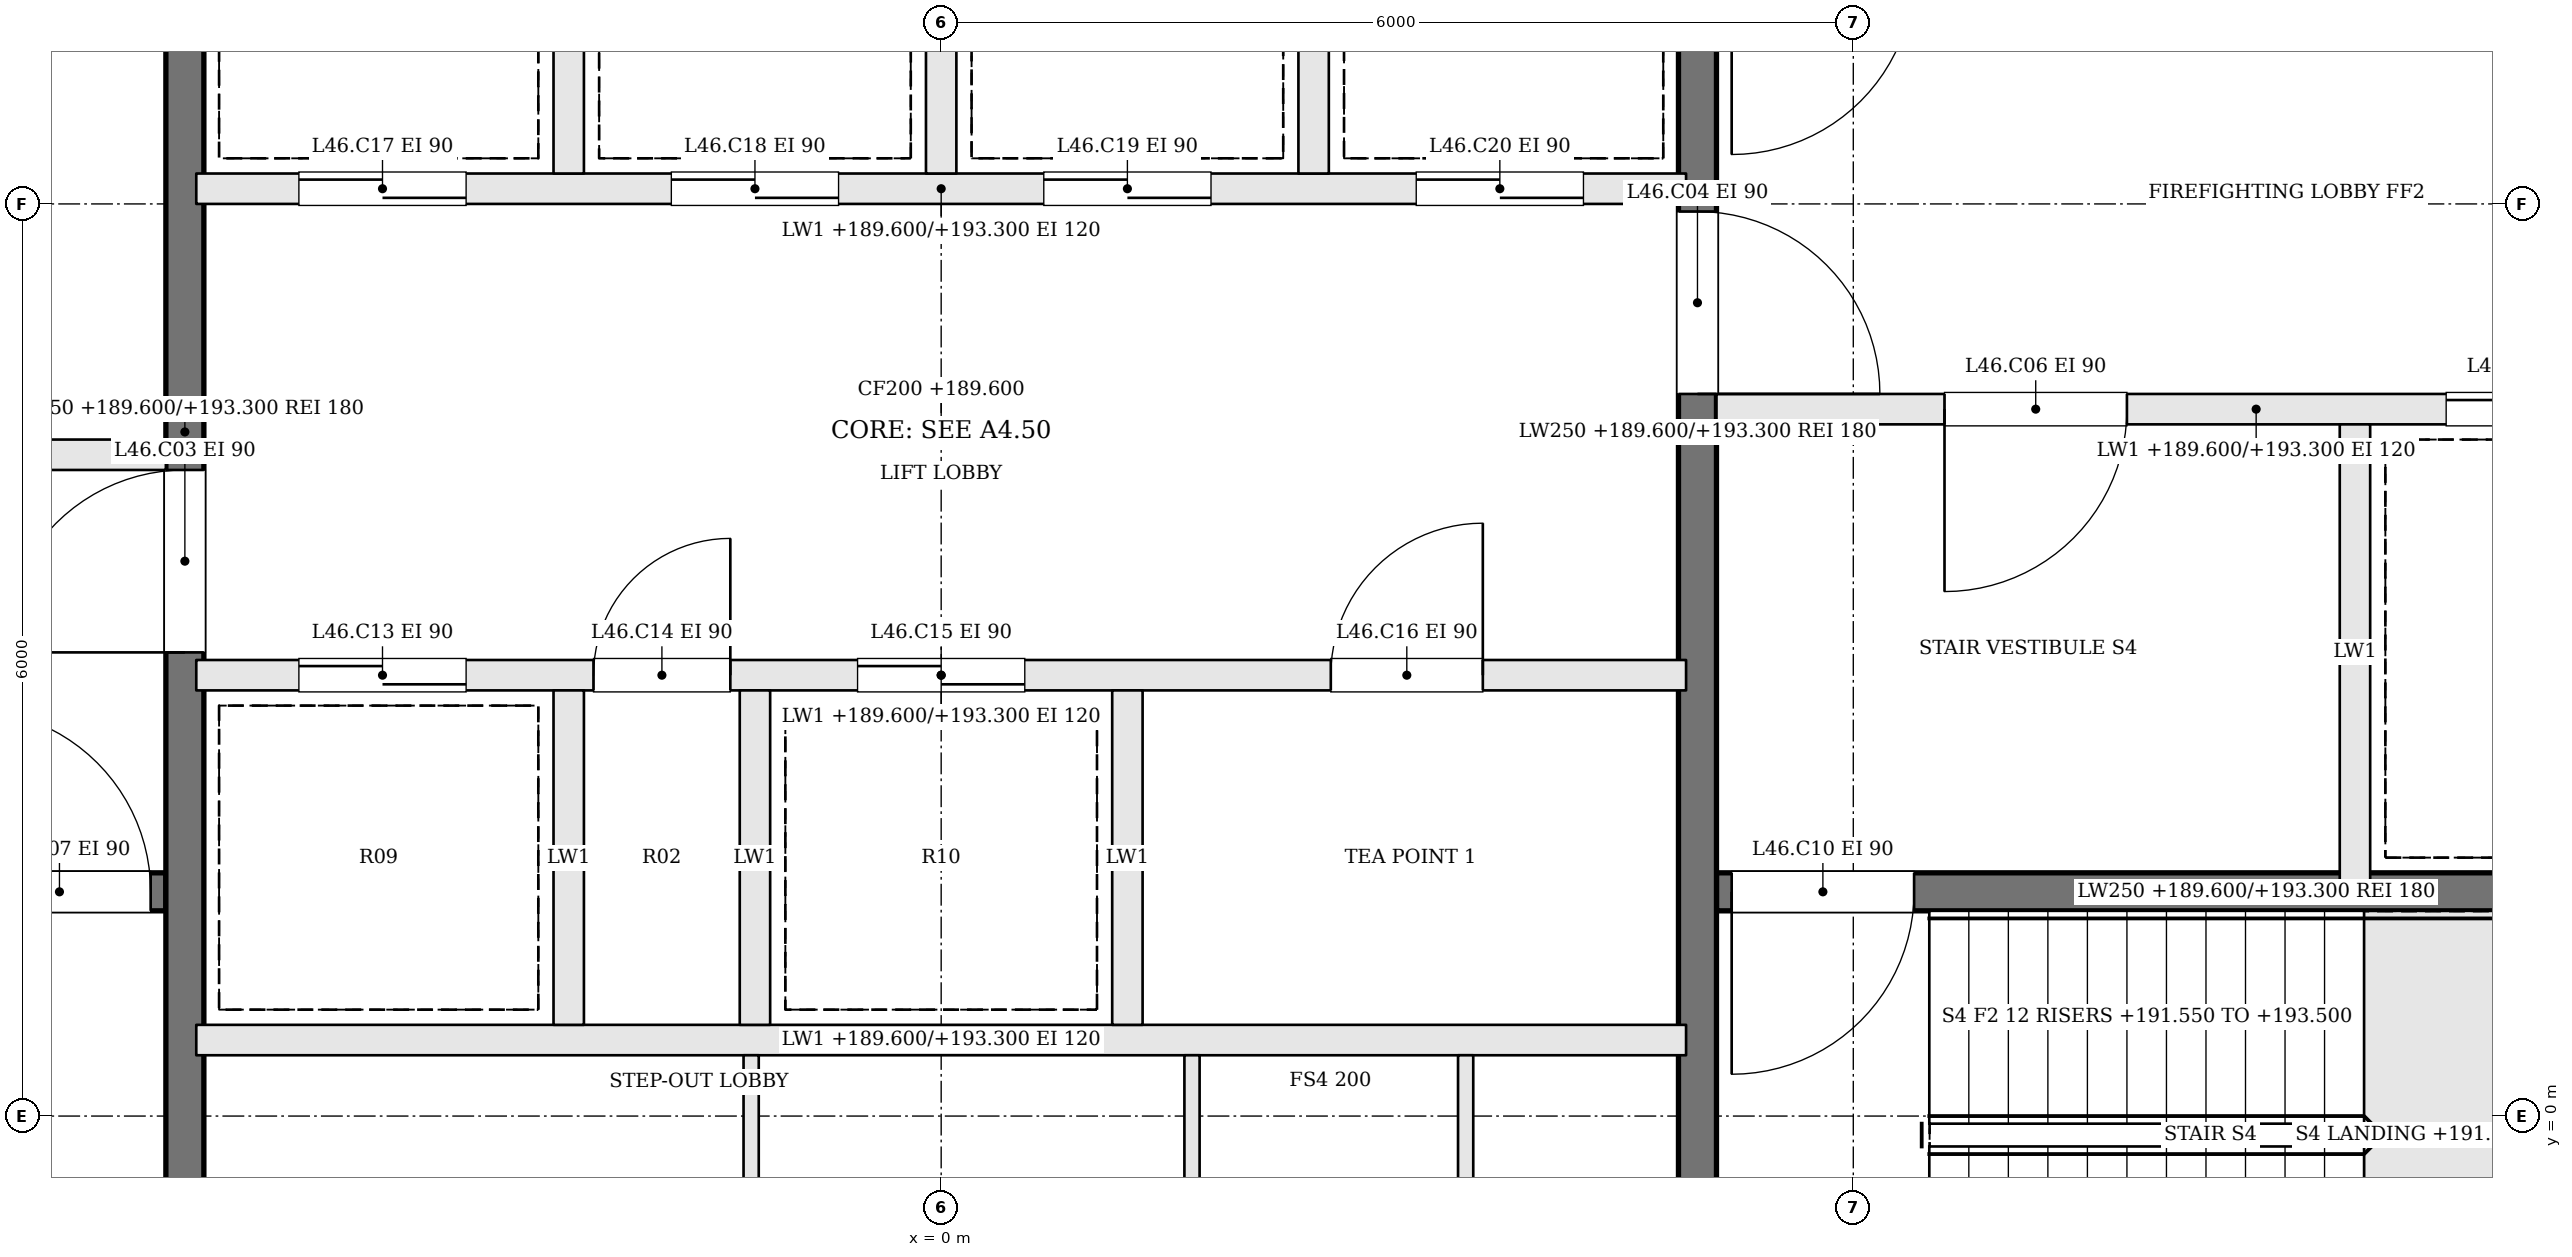
"""IFC4 building model, lengths in metres.
Left out: names, types, materials, properties, quantities, classifications, styles, units other than length and angle.
Written with IfcOpenShell. Run it as: python <this file> out.ifc"""

import sys

from ifc_helpers import new_model, si_unit, direction, frame, frame_2d, origin, place, context, subcontext, project, spatial, rectangle, extrude, element, fill, save


model = new_model("IFC4")
c1 = context("Model", 3, precision=1e-05, world=origin(), true_north=direction((0.0, 1.0)))
c2 = subcontext(c1, "Body", "Model", "MODEL_VIEW")
j1 = project(units=[si_unit("LENGTHUNIT", "METRE"), si_unit("PLANEANGLEUNIT", "RADIAN")], contexts=[c1])
p1 = place(None, origin())
s1 = spatial("IfcSite", under=j1, at=p1, CompositionType="ELEMENT")
p2 = place(p1, origin())
s2 = spatial("IfcBuilding", under=s1, at=p2, CompositionType="ELEMENT")
p3 = place(p2, frame((0.0, 0.0, 189.6)))
s3 = spatial("IfcBuildingStorey", under=s2, at=p3, CompositionType="ELEMENT", Elevation=189.6)
p4 = place(p3, frame((-12.2, 1.475, 0.0), z_axis=(0.0, 0.0, 1.0), x_axis=(1.0, 0.0, 0.0)))
e1 = element("IfcWall", 1, at=p4, inside=s3, PredefinedType="SOLIDWALL", context=c2, shape_type="SweptSolid", body=[
    extrude(rectangle(XDim=7.1, YDim=0.25, at=frame_2d((3.55, 0.0))), origin(), (0.0, 0.0, 1.0), 3.7),
])
p5 = place(p4, frame((5.8, 0.0, 0.0)))
e2 = element("IfcOpeningElement", 2, at=p5, cuts=e1, PredefinedType="OPENING", context=c2, shape_type="SweptSolid", body=[
    extrude(rectangle(XDim=1.2, YDim=2.1, at=frame_2d((0.6, 1.05))), frame((0.0, 0.135, 0.0), z_axis=(0.0, -1.0, 0.0), x_axis=(1.0, 0.0, 0.0)), (0.0, 0.0, 1.0), 0.27),
])
p6 = place(p3, frame((-12.2, 4.35, 0.0), z_axis=(0.0, 0.0, 1.0), x_axis=(1.0, 0.0, 0.0)))
e3 = element("IfcWall", 3, at=p6, inside=s3, PredefinedType="SOLIDWALL", context=c2, shape_type="SweptSolid", body=[
    extrude(rectangle(XDim=7.1, YDim=0.2, at=frame_2d((3.55, 0.0))), origin(), (0.0, 0.0, 1.0), 3.7),
])
p7 = place(p6, frame((4.4, 0.0, 0.0)))
e4 = element("IfcOpeningElement", 4, at=p7, cuts=e3, PredefinedType="OPENING", context=c2, shape_type="SweptSolid", body=[
    extrude(rectangle(XDim=1.2, YDim=2.1, at=frame_2d((0.6, 1.05))), frame((0.0, 0.11, 0.0), z_axis=(0.0, -1.0, 0.0), x_axis=(1.0, 0.0, 0.0)), (0.0, 0.0, 1.0), 0.22),
])
p8 = place(p6, frame((1.1, 0.0, 0.0)))
e5 = element("IfcOpeningElement", 5, at=p8, cuts=e3, PredefinedType="OPENING", context=c2, shape_type="SweptSolid", body=[
    extrude(rectangle(XDim=1.2, YDim=2.1, at=frame_2d((0.6, 1.05))), frame((0.0, 0.11, 0.0), z_axis=(0.0, -1.0, 0.0), x_axis=(1.0, 0.0, 0.0)), (0.0, 0.0, 1.0), 0.22),
])
p9 = place(p3, frame((12.2, 4.65, 0.0), z_axis=(0.0, 0.0, 1.0), x_axis=(-1.0, 0.0, 0.0)))
e6 = element("IfcWall", 6, at=p9, inside=s3, PredefinedType="SOLIDWALL", context=c2, shape_type="SweptSolid", body=[
    extrude(rectangle(XDim=7.1, YDim=0.2, at=frame_2d((3.55, 0.0))), origin(), (0.0, 0.0, 1.0), 3.7),
])
p10 = place(p9, frame((4.4, 0.0, 0.0)))
e7 = element("IfcOpeningElement", 7, at=p10, cuts=e6, PredefinedType="OPENING", context=c2, shape_type="SweptSolid", body=[
    extrude(rectangle(XDim=1.2, YDim=2.1, at=frame_2d((0.6, 1.05))), frame((0.0, 0.11, 0.0), z_axis=(0.0, -1.0, 0.0), x_axis=(1.0, 0.0, 0.0)), (0.0, 0.0, 1.0), 0.22),
])
p11 = place(p9, frame((1.1, 0.0, 0.0)))
e8 = element("IfcOpeningElement", 8, at=p11, cuts=e6, PredefinedType="OPENING", context=c2, shape_type="SweptSolid", body=[
    extrude(rectangle(XDim=1.2, YDim=2.1, at=frame_2d((0.6, 1.05))), frame((0.0, 0.11, 0.0), z_axis=(0.0, -1.0, 0.0), x_axis=(1.0, 0.0, 0.0)), (0.0, 0.0, 1.0), 0.22),
])
p12 = place(p3, frame((12.2, 1.475, 0.0), z_axis=(0.0, 0.0, 1.0), x_axis=(-1.0, 0.0, 0.0)))
e9 = element("IfcWall", 9, at=p12, inside=s3, PredefinedType="SOLIDWALL", context=c2, shape_type="SweptSolid", body=[
    extrude(rectangle(XDim=7.1, YDim=0.25, at=frame_2d((3.55, 0.0))), origin(), (0.0, 0.0, 1.0), 3.7),
])
p13 = place(p12, frame((5.8, 0.0, 0.0)))
e10 = element("IfcOpeningElement", 10, at=p13, cuts=e9, PredefinedType="OPENING", context=c2, shape_type="SweptSolid", body=[
    extrude(rectangle(XDim=1.2, YDim=2.1, at=frame_2d((0.6, 1.05))), frame((0.0, 0.135, 0.0), z_axis=(0.0, -1.0, 0.0), x_axis=(1.0, 0.0, 0.0)), (0.0, 0.0, 1.0), 0.27),
])
p14 = place(p3, frame((9.3, 4.55, 0.0), z_axis=(0.0, 0.0, 1.0), x_axis=(0.0, -1.0, 0.0)))
e11 = element("IfcWall", 11, at=p14, inside=s3, PredefinedType="SOLIDWALL", context=c2, shape_type="SweptSolid", body=[
    extrude(rectangle(XDim=3.0, YDim=0.2, at=frame_2d((1.5, 0.0))), origin(), (0.0, 0.0, 1.0), 3.7),
])
p15 = place(p3, frame((-4.975, -2.2, 0.0), z_axis=(0.0, 0.0, 1.0), x_axis=(0.0, 1.0, 0.0)))
e12 = element("IfcWall", 12, at=p15, inside=s3, PredefinedType="SOLIDWALL", context=c2, shape_type="SweptSolid", body=[
    extrude(rectangle(XDim=13.4, YDim=0.25, at=frame_2d((6.7, 0.0))), origin(), (0.0, 0.0, 1.0), 3.7),
])
p16 = place(p15, frame((5.25, 0.0, 0.0)))
e13 = element("IfcOpeningElement", 13, at=p16, cuts=e12, PredefinedType="OPENING", context=c2, shape_type="SweptSolid", body=[
    extrude(rectangle(XDim=1.2, YDim=2.1, at=frame_2d((0.6, 1.05))), frame((0.0, 0.135, 0.0), z_axis=(0.0, -1.0, 0.0), x_axis=(1.0, 0.0, 0.0)), (0.0, 0.0, 1.0), 0.27),
])
p17 = place(p3, frame((4.975, 11.2, 0.0), z_axis=(0.0, 0.0, 1.0), x_axis=(0.0, -1.0, 0.0)))
e14 = element("IfcWall", 14, at=p17, inside=s3, PredefinedType="SOLIDWALL", context=c2, shape_type="SweptSolid", body=[
    extrude(rectangle(XDim=13.4, YDim=0.25, at=frame_2d((6.7, 0.0))), origin(), (0.0, 0.0, 1.0), 3.7),
])
p18 = place(p17, frame((5.25, 0.0, 0.0)))
e15 = element("IfcOpeningElement", 15, at=p18, cuts=e14, PredefinedType="OPENING", context=c2, shape_type="SweptSolid", body=[
    extrude(rectangle(XDim=1.2, YDim=2.1, at=frame_2d((0.6, 1.05))), frame((0.0, 0.135, 0.0), z_axis=(0.0, -1.0, 0.0), x_axis=(1.0, 0.0, 0.0)), (0.0, 0.0, 1.0), 0.27),
])
p19 = place(p3, frame((-4.9, 0.5, 0.0), z_axis=(0.0, 0.0, 1.0), x_axis=(1.0, 0.0, 0.0)))
e16 = element("IfcWall", 16, at=p19, inside=s3, PredefinedType="SOLIDWALL", context=c2, shape_type="SweptSolid", body=[
    extrude(rectangle(XDim=9.8, YDim=0.2, at=frame_2d((4.9, 0.0))), origin(), (0.0, 0.0, 1.0), 3.7),
])
p20 = place(p3, frame((-4.9, 2.9, 0.0), z_axis=(0.0, 0.0, 1.0), x_axis=(1.0, 0.0, 0.0)))
e17 = element("IfcWall", 17, at=p20, inside=s3, PredefinedType="SOLIDWALL", context=c2, shape_type="SweptSolid", body=[
    extrude(rectangle(XDim=9.8, YDim=0.2, at=frame_2d((4.9, 0.0))), origin(), (0.0, 0.0, 1.0), 3.7),
])
p21 = place(p20, frame((0.675, 0.0, 0.0)))
e18 = element("IfcOpeningElement", 18, at=p21, cuts=e17, PredefinedType="OPENING", context=c2, shape_type="SweptSolid", body=[
    extrude(rectangle(XDim=1.1, YDim=2.1, at=frame_2d((0.55, 1.05))), frame((0.0, 0.11, 0.0), z_axis=(0.0, -1.0, 0.0), x_axis=(1.0, 0.0, 0.0)), (0.0, 0.0, 1.0), 0.22),
])
p22 = place(p20, frame((2.613, 0.0, 0.0)))
e19 = element("IfcOpeningElement", 19, at=p22, cuts=e17, PredefinedType="OPENING", context=c2, shape_type="SweptSolid", body=[
    extrude(rectangle(XDim=0.9, YDim=2.1, at=frame_2d((0.45, 1.05))), frame((0.0, 0.11, 0.0), z_axis=(0.0, -1.0, 0.0), x_axis=(1.0, 0.0, 0.0)), (0.0, 0.0, 1.0), 0.22),
])
p23 = place(p20, frame((4.35, 0.0, 0.0)))
e20 = element("IfcOpeningElement", 20, at=p23, cuts=e17, PredefinedType="OPENING", context=c2, shape_type="SweptSolid", body=[
    extrude(rectangle(XDim=1.1, YDim=2.1, at=frame_2d((0.55, 1.05))), frame((0.0, 0.11, 0.0), z_axis=(0.0, -1.0, 0.0), x_axis=(1.0, 0.0, 0.0)), (0.0, 0.0, 1.0), 0.22),
])
p24 = place(p20, frame((7.463, 0.0, 0.0)))
e21 = element("IfcOpeningElement", 21, at=p24, cuts=e17, PredefinedType="OPENING", context=c2, shape_type="SweptSolid", body=[
    extrude(rectangle(XDim=1.0, YDim=2.1, at=frame_2d((0.5, 1.05))), frame((0.0, 0.11, 0.0), z_axis=(0.0, -1.0, 0.0), x_axis=(1.0, 0.0, 0.0)), (0.0, 0.0, 1.0), 0.22),
])
p25 = place(p3, frame((-4.9, 6.1, 0.0), z_axis=(0.0, 0.0, 1.0), x_axis=(1.0, 0.0, 0.0)))
e22 = element("IfcWall", 22, at=p25, inside=s3, PredefinedType="SOLIDWALL", context=c2, shape_type="SweptSolid", body=[
    extrude(rectangle(XDim=9.8, YDim=0.2, at=frame_2d((4.9, 0.0))), origin(), (0.0, 0.0, 1.0), 3.7),
])
p26 = place(p25, frame((0.675, 0.0, 0.0)))
e23 = element("IfcOpeningElement", 23, at=p26, cuts=e22, PredefinedType="OPENING", context=c2, shape_type="SweptSolid", body=[
    extrude(rectangle(XDim=1.1, YDim=2.1, at=frame_2d((0.55, 1.05))), frame((0.0, 0.11, 0.0), z_axis=(0.0, -1.0, 0.0), x_axis=(1.0, 0.0, 0.0)), (0.0, 0.0, 1.0), 0.22),
])
p27 = place(p25, frame((3.125, 0.0, 0.0)))
e24 = element("IfcOpeningElement", 24, at=p27, cuts=e22, PredefinedType="OPENING", context=c2, shape_type="SweptSolid", body=[
    extrude(rectangle(XDim=1.1, YDim=2.1, at=frame_2d((0.55, 1.05))), frame((0.0, 0.11, 0.0), z_axis=(0.0, -1.0, 0.0), x_axis=(1.0, 0.0, 0.0)), (0.0, 0.0, 1.0), 0.22),
])
p28 = place(p25, frame((5.575, 0.0, 0.0)))
e25 = element("IfcOpeningElement", 25, at=p28, cuts=e22, PredefinedType="OPENING", context=c2, shape_type="SweptSolid", body=[
    extrude(rectangle(XDim=1.1, YDim=2.1, at=frame_2d((0.55, 1.05))), frame((0.0, 0.11, 0.0), z_axis=(0.0, -1.0, 0.0), x_axis=(1.0, 0.0, 0.0)), (0.0, 0.0, 1.0), 0.22),
])
p29 = place(p25, frame((8.025, 0.0, 0.0)))
e26 = element("IfcOpeningElement", 26, at=p29, cuts=e22, PredefinedType="OPENING", context=c2, shape_type="SweptSolid", body=[
    extrude(rectangle(XDim=1.1, YDim=2.1, at=frame_2d((0.55, 1.05))), frame((0.0, 0.11, 0.0), z_axis=(0.0, -1.0, 0.0), x_axis=(1.0, 0.0, 0.0)), (0.0, 0.0, 1.0), 0.22),
])
for number, where, z_axis, x_axis in (
    (27, (-2.45, 0.6, 0.0), (0.0, 0.0, 1.0), (0.0, 1.0, 0.0)),
    (28, (-1.225, 0.6, 0.0), (0.0, 0.0, 1.0), (0.0, 1.0, 0.0)),
    (29, (1.225, 0.6, 0.0), (0.0, 0.0, 1.0), (0.0, 1.0, 0.0)),
    (30, (-2.45, 6.2, 0.0), (0.0, 0.0, 1.0), (0.0, 1.0, 0.0)),
    (31, (0.0, 6.2, 0.0), (0.0, 0.0, 1.0), (0.0, 1.0, 0.0)),
    (32, (2.45, 6.2, 0.0), (0.0, 0.0, 1.0), (0.0, 1.0, 0.0)),
):
    element("IfcWall", number, at=place(p3, frame(where, z_axis=z_axis, x_axis=x_axis)), inside=s3, PredefinedType="SOLIDWALL", context=c2, shape_type="SweptSolid", body=[
        extrude(rectangle(XDim=2.2, YDim=0.2, at=frame_2d((1.1, 0.0))), origin(), (0.0, 0.0, 1.0), 3.7),
    ])
for number, where, z_axis, x_axis in (
    (33, (-1.25, -2.2, 0.0), (0.0, 0.0, 1.0), (0.0, 1.0, 0.0)),
    (34, (1.65, -2.2, 0.0), (0.0, 0.0, 1.0), (0.0, 1.0, 0.0)),
    (35, (3.45, -2.2, 0.0), (0.0, 0.0, 1.0), (0.0, 1.0, 0.0)),
):
    element("IfcWall", number, at=place(p3, frame(where, z_axis=z_axis, x_axis=x_axis)), inside=s3, PredefinedType="PARTITIONING", context=c2, shape_type="SweptSolid", body=[
        extrude(rectangle(XDim=2.6, YDim=0.1, at=frame_2d((1.3, 0.0))), origin(), (0.0, 0.0, 1.0), 3.7),
    ])
p30 = place(p16, origin())
e36 = element("IfcDoor", 36, at=p30, inside=s3, OperationType="SINGLE_SWING_LEFT", PredefinedType="DOOR", context=c2, shape_type="SweptSolid", body=[
    extrude(rectangle(XDim=1.2, YDim=2.1, at=frame_2d((0.6, 1.05))), frame((0.0, 0.025, 0.0), z_axis=(0.0, -1.0, 0.0), x_axis=(1.0, 0.0, 0.0)), (0.0, 0.0, 1.0), 0.05),
])
fill(e13, e36)
p31 = place(p18, origin())
e37 = element("IfcDoor", 37, at=p31, inside=s3, OperationType="SINGLE_SWING_RIGHT", PredefinedType="DOOR", context=c2, shape_type="SweptSolid", body=[
    extrude(rectangle(XDim=1.2, YDim=2.1, at=frame_2d((0.6, 1.05))), frame((0.0, 0.025, 0.0), z_axis=(0.0, -1.0, 0.0), x_axis=(1.0, 0.0, 0.0)), (0.0, 0.0, 1.0), 0.05),
])
fill(e15, e37)
p32 = place(p10, origin())
e38 = element("IfcDoor", 38, at=p32, inside=s3, OperationType="SINGLE_SWING_RIGHT", PredefinedType="DOOR", context=c2, shape_type="SweptSolid", body=[
    extrude(rectangle(XDim=1.2, YDim=2.1, at=frame_2d((0.6, 1.05))), frame((0.0, 0.025, 0.0), z_axis=(0.0, -1.0, 0.0), x_axis=(1.0, 0.0, 0.0)), (0.0, 0.0, 1.0), 0.05),
])
fill(e7, e38)
p33 = place(p5, origin())
e39 = element("IfcDoor", 39, at=p33, inside=s3, OperationType="SINGLE_SWING_LEFT", PredefinedType="DOOR", context=c2, shape_type="SweptSolid", body=[
    extrude(rectangle(XDim=1.2, YDim=2.1, at=frame_2d((0.6, 1.05))), frame((0.0, 0.025, 0.0), z_axis=(0.0, -1.0, 0.0), x_axis=(1.0, 0.0, 0.0)), (0.0, 0.0, 1.0), 0.05),
])
fill(e2, e39)
p34 = place(p13, origin())
e40 = element("IfcDoor", 40, at=p34, inside=s3, OperationType="SINGLE_SWING_RIGHT", PredefinedType="DOOR", context=c2, shape_type="SweptSolid", body=[
    extrude(rectangle(XDim=1.2, YDim=2.1, at=frame_2d((0.6, 1.05))), frame((0.0, 0.025, 0.0), z_axis=(0.0, -1.0, 0.0), x_axis=(1.0, 0.0, 0.0)), (0.0, 0.0, 1.0), 0.05),
])
fill(e10, e40)
p35 = place(p11, origin())
e41 = element("IfcDoor", 41, at=p35, inside=s3, OperationType="SLIDING_TO_RIGHT", PredefinedType="DOOR", context=c2, shape_type="SweptSolid", body=[
    extrude(rectangle(XDim=1.2, YDim=2.1, at=frame_2d((0.6, 1.05))), frame((0.0, 0.025, 0.0), z_axis=(0.0, -1.0, 0.0), x_axis=(1.0, 0.0, 0.0)), (0.0, 0.0, 1.0), 0.05),
])
fill(e8, e41)
p36 = place(p21, origin())
e42 = element("IfcDoor", 42, at=p36, inside=s3, OperationType="SLIDING_TO_RIGHT", PredefinedType="DOOR", context=c2, shape_type="SweptSolid", body=[
    extrude(rectangle(XDim=1.1, YDim=2.1, at=frame_2d((0.55, 1.05))), frame((0.0, 0.025, 0.0), z_axis=(0.0, -1.0, 0.0), x_axis=(1.0, 0.0, 0.0)), (0.0, 0.0, 1.0), 0.05),
])
fill(e18, e42)
p37 = place(p22, origin())
e43 = element("IfcDoor", 43, at=p37, inside=s3, OperationType="SINGLE_SWING_RIGHT", PredefinedType="DOOR", context=c2, shape_type="SweptSolid", body=[
    extrude(rectangle(XDim=0.9, YDim=2.1, at=frame_2d((0.45, 1.05))), frame((0.0, 0.025, 0.0), z_axis=(0.0, -1.0, 0.0), x_axis=(1.0, 0.0, 0.0)), (0.0, 0.0, 1.0), 0.05),
])
fill(e19, e43)
p38 = place(p23, origin())
e44 = element("IfcDoor", 44, at=p38, inside=s3, OperationType="SLIDING_TO_LEFT", PredefinedType="DOOR", context=c2, shape_type="SweptSolid", body=[
    extrude(rectangle(XDim=1.1, YDim=2.1, at=frame_2d((0.55, 1.05))), frame((0.0, 0.025, 0.0), z_axis=(0.0, -1.0, 0.0), x_axis=(1.0, 0.0, 0.0)), (0.0, 0.0, 1.0), 0.05),
])
fill(e20, e44)
p39 = place(p24, origin())
e45 = element("IfcDoor", 45, at=p39, inside=s3, OperationType="SINGLE_SWING_RIGHT", PredefinedType="DOOR", context=c2, shape_type="SweptSolid", body=[
    extrude(rectangle(XDim=1.0, YDim=2.1, at=frame_2d((0.5, 1.05))), frame((0.0, 0.025, 0.0), z_axis=(0.0, -1.0, 0.0), x_axis=(1.0, 0.0, 0.0)), (0.0, 0.0, 1.0), 0.05),
])
fill(e21, e45)
p40 = place(p26, origin())
e46 = element("IfcDoor", 46, at=p40, inside=s3, OperationType="SLIDING_TO_RIGHT", PredefinedType="DOOR", context=c2, shape_type="SweptSolid", body=[
    extrude(rectangle(XDim=1.1, YDim=2.1, at=frame_2d((0.55, 1.05))), frame((0.0, 0.025, 0.0), z_axis=(0.0, -1.0, 0.0), x_axis=(1.0, 0.0, 0.0)), (0.0, 0.0, 1.0), 0.05),
])
fill(e23, e46)
p41 = place(p27, origin())
e47 = element("IfcDoor", 47, at=p41, inside=s3, OperationType="SLIDING_TO_LEFT", PredefinedType="DOOR", context=c2, shape_type="SweptSolid", body=[
    extrude(rectangle(XDim=1.1, YDim=2.1, at=frame_2d((0.55, 1.05))), frame((0.0, 0.025, 0.0), z_axis=(0.0, -1.0, 0.0), x_axis=(1.0, 0.0, 0.0)), (0.0, 0.0, 1.0), 0.05),
])
fill(e24, e47)
p42 = place(p28, origin())
e48 = element("IfcDoor", 48, at=p42, inside=s3, OperationType="SLIDING_TO_RIGHT", PredefinedType="DOOR", context=c2, shape_type="SweptSolid", body=[
    extrude(rectangle(XDim=1.1, YDim=2.1, at=frame_2d((0.55, 1.05))), frame((0.0, 0.025, 0.0), z_axis=(0.0, -1.0, 0.0), x_axis=(1.0, 0.0, 0.0)), (0.0, 0.0, 1.0), 0.05),
])
fill(e25, e48)
p43 = place(p29, origin())
e49 = element("IfcDoor", 49, at=p43, inside=s3, OperationType="SLIDING_TO_LEFT", PredefinedType="DOOR", context=c2, shape_type="SweptSolid", body=[
    extrude(rectangle(XDim=1.1, YDim=2.1, at=frame_2d((0.55, 1.05))), frame((0.0, 0.025, 0.0), z_axis=(0.0, -1.0, 0.0), x_axis=(1.0, 0.0, 0.0)), (0.0, 0.0, 1.0), 0.05),
])
fill(e26, e49)
save(model, sys.argv[1])
